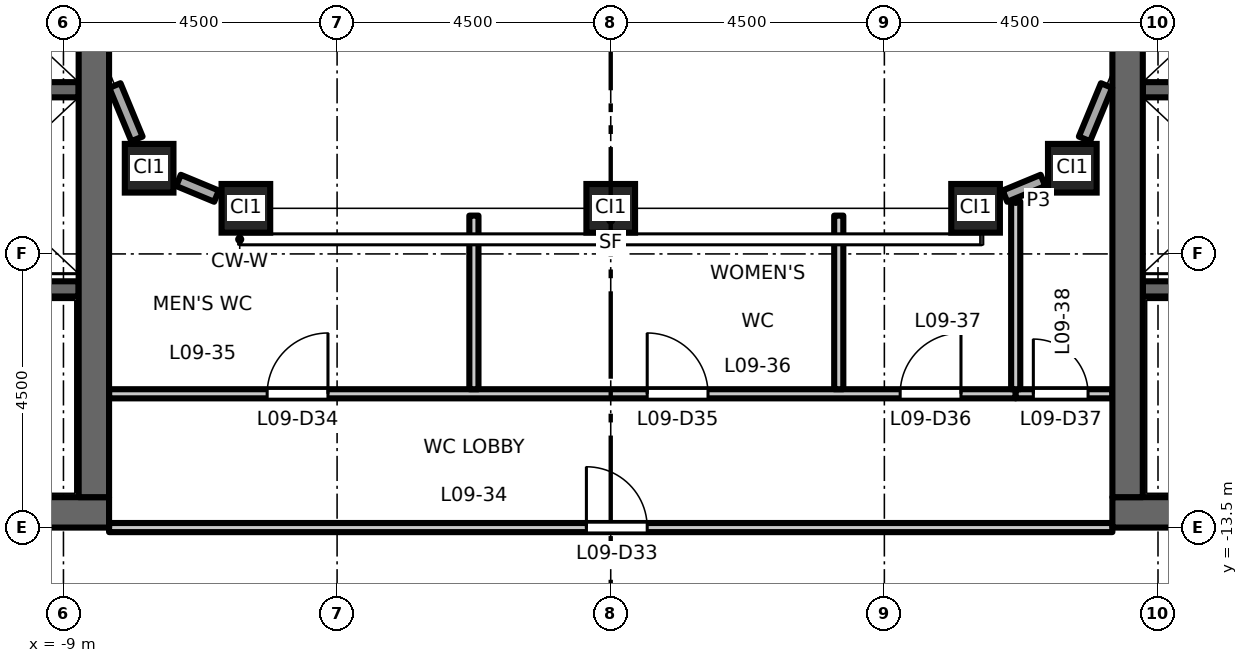
"""IFC4 building model, lengths in metres.
Left out: names, types, materials, properties, quantities, classifications, styles, units other than length and angle.
Written with IfcOpenShell. Run it as: python <this file> out.ifc"""

import sys

from ifc_helpers import new_model, si_unit, direction, frame, frame_2d, origin, origin_2d, place, context, subcontext, project, spatial, rectangle, hollow_rectangle, extrude, element, fill, save


model = new_model("IFC4")
c1 = context("Model", 3, precision=1e-05, world=origin(), true_north=direction((0.0, 1.0)))
c2 = subcontext(c1, "Body", "Model", "MODEL_VIEW")
j1 = project(units=[si_unit("LENGTHUNIT", "METRE"), si_unit("PLANEANGLEUNIT", "RADIAN")], contexts=[c1])
p1 = place(None, origin())
s1 = spatial("IfcSite", under=j1, at=p1, CompositionType="ELEMENT")
p2 = place(p1, origin())
s2 = spatial("IfcBuilding", under=s1, at=p2, CompositionType="ELEMENT")
p3 = place(p2, frame((0.0, 0.0, 44.7)))
s3 = spatial("IfcBuildingStorey", under=s2, at=p3, CompositionType="ELEMENT", Elevation=44.7)
for number, where, z_axis, x_axis in (
    (1, (-7.591, -7.591, 0.0), (0.0, 0.0, 1.0), (1.0, 0.0, 0.0)),
    (2, (-6.0, -8.25, 0.0), (0.0, 0.0, 1.0), (1.0, 0.0, 0.0)),
    (3, (0.0, -8.25, 0.0), (0.0, 0.0, 1.0), (1.0, 0.0, 0.0)),
    (4, (6.0, -8.25, 0.0), (0.0, 0.0, 1.0), (1.0, 0.0, 0.0)),
    (5, (7.591, -7.591, 0.0), (0.0, 0.0, 1.0), (1.0, 0.0, 0.0)),
):
    element("IfcColumn", number, at=place(p3, frame(where, z_axis=z_axis, x_axis=x_axis)), inside=s3, PredefinedType="COLUMN", context=c2, shape_type="SweptSolid", body=[
        extrude(hollow_rectangle(XDim=0.8, YDim=0.8, WallThickness=0.05, at=origin_2d()), origin(), (0.0, 0.0, 1.0), 4.5),
    ])
p4 = place(p3, frame((-8.75, -6.3, 0.0), z_axis=(0.0, 0.0, 1.0), x_axis=(-1.0, 0.0, 0.0)))
e6 = element("IfcWall", 6, at=p4, inside=s3, PredefinedType="SHEAR", context=c2, shape_type="SweptSolid", body=[
    extrude(rectangle(XDim=3.1, YDim=0.25, at=frame_2d((1.55, 0.0))), origin(), (0.0, 0.0, 1.0), 4.35),
])
p5 = place(p3, frame((-8.75, -9.575, 0.0), z_axis=(0.0, 0.0, 1.0), x_axis=(-1.0, 0.0, 0.0)))
e7 = element("IfcWall", 7, at=p5, inside=s3, PredefinedType="SHEAR", context=c2, shape_type="SweptSolid", body=[
    extrude(rectangle(XDim=8.0, YDim=0.25, at=frame_2d((4.0, 0.0))), origin(), (0.0, 0.0, 1.0), 4.35),
])
p6 = place(p5, frame((6.65, 0.0, 0.0)))
e8 = element("IfcOpeningElement", 8, at=p6, cuts=e7, PredefinedType="OPENING", context=c2, shape_type="SweptSolid", body=[
    extrude(rectangle(XDim=1.1, YDim=2.1, at=frame_2d((0.55, 1.05))), frame((0.0, 0.135, 0.0), z_axis=(0.0, -1.0, 0.0), x_axis=(1.0, 0.0, 0.0)), (0.0, 0.0, 1.0), 0.27),
])
p7 = place(p3, frame((-8.25, -13.25, 0.0), z_axis=(0.0, 0.0, 1.0), x_axis=(-1.0, 0.0, 0.0)))
e9 = element("IfcWall", 9, at=p7, inside=s3, PredefinedType="SHEAR", context=c2, shape_type="SweptSolid", body=[
    extrude(rectangle(XDim=13.5, YDim=0.5, at=frame_2d((6.75, 0.0))), origin(), (0.0, 0.0, 1.0), 4.35),
])
p8 = place(p3, frame((-8.5, -13.0, 0.0), z_axis=(0.0, 0.0, 1.0), x_axis=(0.0, 1.0, 0.0)))
e10 = element("IfcWall", 10, at=p8, inside=s3, PredefinedType="SHEAR", context=c2, shape_type="SweptSolid", body=[
    extrude(rectangle(XDim=26.0, YDim=0.5, at=frame_2d((13.0, 0.0))), origin(), (0.0, 0.0, 1.0), 4.35),
])
p9 = place(p3, frame((8.75, -6.3, 0.0), z_axis=(0.0, 0.0, 1.0), x_axis=(1.0, 0.0, 0.0)))
e11 = element("IfcWall", 11, at=p9, inside=s3, PredefinedType="SHEAR", context=c2, shape_type="SweptSolid", body=[
    extrude(rectangle(XDim=3.1, YDim=0.25, at=frame_2d((1.55, 0.0))), origin(), (0.0, 0.0, 1.0), 4.35),
])
p10 = place(p3, frame((8.75, -9.575, 0.0), z_axis=(0.0, 0.0, 1.0), x_axis=(1.0, 0.0, 0.0)))
e12 = element("IfcWall", 12, at=p10, inside=s3, PredefinedType="SHEAR", context=c2, shape_type="SweptSolid", body=[
    extrude(rectangle(XDim=8.0, YDim=0.25, at=frame_2d((4.0, 0.0))), origin(), (0.0, 0.0, 1.0), 4.35),
])
p11 = place(p10, frame((6.65, 0.0, 0.0)))
e13 = element("IfcOpeningElement", 13, at=p11, cuts=e12, PredefinedType="OPENING", context=c2, shape_type="SweptSolid", body=[
    extrude(rectangle(XDim=1.1, YDim=2.1, at=frame_2d((0.55, 1.05))), frame((0.0, 0.135, 0.0), z_axis=(0.0, -1.0, 0.0), x_axis=(1.0, 0.0, 0.0)), (0.0, 0.0, 1.0), 0.27),
])
p12 = place(p3, frame((8.25, -13.25, 0.0), z_axis=(0.0, 0.0, 1.0), x_axis=(1.0, 0.0, 0.0)))
e14 = element("IfcWall", 14, at=p12, inside=s3, PredefinedType="SHEAR", context=c2, shape_type="SweptSolid", body=[
    extrude(rectangle(XDim=13.5, YDim=0.5, at=frame_2d((6.75, 0.0))), origin(), (0.0, 0.0, 1.0), 4.35),
])
p13 = place(p3, frame((8.5, -13.0, 0.0), z_axis=(0.0, 0.0, 1.0), x_axis=(0.0, 1.0, 0.0)))
e15 = element("IfcWall", 15, at=p13, inside=s3, PredefinedType="SHEAR", context=c2, shape_type="SweptSolid", body=[
    extrude(rectangle(XDim=26.0, YDim=0.5, at=frame_2d((13.0, 0.0))), origin(), (0.0, 0.0, 1.0), 4.35),
])
p14 = place(p3, frame((6.483, -8.05, 0.0), z_axis=(0.0, 0.0, 1.0), x_axis=(0.923854141361, 0.382744726273, 0.0)))
e16 = element("IfcWall", 16, at=p14, inside=s3, PredefinedType="STANDARD", context=c2, shape_type="SweptSolid", body=[
    extrude(rectangle(XDim=0.677, YDim=0.2, at=frame_2d((0.338, 0.0))), origin(), (0.0, 0.0, 1.0), 3.73),
])
for number, where, z_axis, x_axis in (
    (17, (7.791, -7.108, 0.0), (0.0, 0.0, 1.0), (0.383, 0.924, 0.0)),
    (18, (-8.154, -6.231, 0.0), (0.0, 0.0, 1.0), (0.383, -0.924, 0.0)),
):
    element("IfcWall", number, at=place(p3, frame(where, z_axis=z_axis, x_axis=x_axis)), inside=s3, PredefinedType="STANDARD", context=c2, shape_type="SweptSolid", body=[
        extrude(rectangle(XDim=0.949, YDim=0.2, at=frame_2d((0.475, 0.0))), origin(), (0.0, 0.0, 1.0), 3.73),
    ])
p15 = place(p3, frame((-7.108, -7.791, 0.0), z_axis=(0.0, 0.0, 1.0), x_axis=(0.923854141361, -0.382744726273, 0.0)))
e19 = element("IfcWall", 19, at=p15, inside=s3, PredefinedType="STANDARD", context=c2, shape_type="SweptSolid", body=[
    extrude(rectangle(XDim=0.677, YDim=0.2, at=frame_2d((0.338, 0.0))), origin(), (0.0, 0.0, 1.0), 3.73),
])
p16 = place(p3, frame((-8.25, -13.5, 0.0), z_axis=(0.0, 0.0, 1.0), x_axis=(1.0, 0.0, 0.0)))
e20 = element("IfcWall", 20, at=p16, inside=s3, PredefinedType="PARTITIONING", context=c2, shape_type="SweptSolid", body=[
    extrude(rectangle(XDim=16.5, YDim=0.15, at=frame_2d((8.25, 0.0))), origin(), (0.0, 0.0, 1.0), 3.85),
])
p17 = place(p16, frame((7.85, 0.0, 0.0)))
e21 = element("IfcOpeningElement", 21, at=p17, cuts=e20, PredefinedType="OPENING", context=c2, shape_type="SweptSolid", body=[
    extrude(rectangle(XDim=1.0, YDim=2.1, at=frame_2d((0.5, 1.05))), frame((0.0, 0.085, 0.0), z_axis=(0.0, -1.0, 0.0), x_axis=(1.0, 0.0, 0.0)), (0.0, 0.0, 1.0), 0.17),
])
p18 = place(p3, frame((-8.25, -11.3, 0.0), z_axis=(0.0, 0.0, 1.0), x_axis=(1.0, 0.0, 0.0)))
e22 = element("IfcWall", 22, at=p18, inside=s3, PredefinedType="PARTITIONING", context=c2, shape_type="SweptSolid", body=[
    extrude(rectangle(XDim=14.91, YDim=0.15, at=frame_2d((7.455, 0.0))), origin(), (0.0, 0.0, 1.0), 4.35),
])
p19 = place(p18, frame((2.6, 0.0, 0.0)))
e23 = element("IfcOpeningElement", 23, at=p19, cuts=e22, PredefinedType="OPENING", context=c2, shape_type="SweptSolid", body=[
    extrude(rectangle(XDim=1.0, YDim=2.1, at=frame_2d((0.5, 1.05))), frame((0.0, 0.085, 0.0), z_axis=(0.0, -1.0, 0.0), x_axis=(1.0, 0.0, 0.0)), (0.0, 0.0, 1.0), 0.17),
])
p20 = place(p18, frame((8.85, 0.0, 0.0)))
e24 = element("IfcOpeningElement", 24, at=p20, cuts=e22, PredefinedType="OPENING", context=c2, shape_type="SweptSolid", body=[
    extrude(rectangle(XDim=1.0, YDim=2.1, at=frame_2d((0.5, 1.05))), frame((0.0, 0.085, 0.0), z_axis=(0.0, -1.0, 0.0), x_axis=(1.0, 0.0, 0.0)), (0.0, 0.0, 1.0), 0.17),
])
p21 = place(p18, frame((13.01, 0.0, 0.0)))
e25 = element("IfcOpeningElement", 25, at=p21, cuts=e22, PredefinedType="OPENING", context=c2, shape_type="SweptSolid", body=[
    extrude(rectangle(XDim=1.0, YDim=2.1, at=frame_2d((0.5, 1.05))), frame((0.0, 0.085, 0.0), z_axis=(0.0, -1.0, 0.0), x_axis=(1.0, 0.0, 0.0)), (0.0, 0.0, 1.0), 0.17),
])
p22 = place(p3, frame((6.66, -11.3, 0.0), z_axis=(0.0, 0.0, 1.0), x_axis=(1.0, 0.0, 0.0)))
e26 = element("IfcWall", 26, at=p22, inside=s3, PredefinedType="PARTITIONING", context=c2, shape_type="SweptSolid", body=[
    extrude(rectangle(XDim=1.59, YDim=0.15, at=frame_2d((0.795, 0.0))), origin(), (0.0, 0.0, 1.0), 4.35),
])
p23 = place(p22, frame((0.29, 0.0, 0.0)))
e27 = element("IfcOpeningElement", 27, at=p23, cuts=e26, PredefinedType="OPENING", context=c2, shape_type="SweptSolid", body=[
    extrude(rectangle(XDim=0.9, YDim=2.1, at=frame_2d((0.45, 1.05))), frame((0.0, 0.085, 0.0), z_axis=(0.0, -1.0, 0.0), x_axis=(1.0, 0.0, 0.0)), (0.0, 0.0, 1.0), 0.17),
])
for number, where, z_axis, x_axis in (
    (28, (-2.25, -11.225, 0.0), (0.0, 0.0, 1.0), (0.0, 1.0, 0.0)),
    (29, (3.75, -11.225, 0.0), (0.0, 0.0, 1.0), (0.0, 1.0, 0.0)),
):
    element("IfcWall", number, at=place(p3, frame(where, z_axis=z_axis, x_axis=x_axis)), inside=s3, PredefinedType="PARTITIONING", context=c2, shape_type="SweptSolid", body=[
        extrude(rectangle(XDim=2.855, YDim=0.15, at=frame_2d((1.427, 0.0))), origin(), (0.0, 0.0, 1.0), 4.35),
    ])
p24 = place(p3, frame((6.66, -11.225, 0.0), z_axis=(0.0, 0.0, 1.0), x_axis=(0.0, 1.0, 0.0)))
e30 = element("IfcWall", 30, at=p24, inside=s3, PredefinedType="PARTITIONING", context=c2, shape_type="SweptSolid", body=[
    extrude(rectangle(XDim=3.089, YDim=0.15, at=frame_2d((1.544, 0.0))), origin(), (0.0, 0.0, 1.0), 4.35),
])
p25 = place(p17, origin())
e31 = element("IfcDoor", 31, at=p25, inside=s3, OperationType="SINGLE_SWING_LEFT", PredefinedType="DOOR", context=c2, shape_type="SweptSolid", body=[
    extrude(rectangle(XDim=1.0, YDim=2.1, at=frame_2d((0.5, 1.05))), frame((0.0, 0.025, 0.0), z_axis=(0.0, -1.0, 0.0), x_axis=(1.0, 0.0, 0.0)), (0.0, 0.0, 1.0), 0.05),
])
fill(e21, e31)
p26 = place(p19, origin())
e32 = element("IfcDoor", 32, at=p26, inside=s3, OperationType="SINGLE_SWING_RIGHT", PredefinedType="DOOR", context=c2, shape_type="SweptSolid", body=[
    extrude(rectangle(XDim=1.0, YDim=2.1, at=frame_2d((0.5, 1.05))), frame((0.0, 0.025, 0.0), z_axis=(0.0, -1.0, 0.0), x_axis=(1.0, 0.0, 0.0)), (0.0, 0.0, 1.0), 0.05),
])
fill(e23, e32)
p27 = place(p20, origin())
e33 = element("IfcDoor", 33, at=p27, inside=s3, OperationType="SINGLE_SWING_LEFT", PredefinedType="DOOR", context=c2, shape_type="SweptSolid", body=[
    extrude(rectangle(XDim=1.0, YDim=2.1, at=frame_2d((0.5, 1.05))), frame((0.0, 0.025, 0.0), z_axis=(0.0, -1.0, 0.0), x_axis=(1.0, 0.0, 0.0)), (0.0, 0.0, 1.0), 0.05),
])
fill(e24, e33)
p28 = place(p21, origin())
e34 = element("IfcDoor", 34, at=p28, inside=s3, OperationType="SINGLE_SWING_RIGHT", PredefinedType="DOOR", context=c2, shape_type="SweptSolid", body=[
    extrude(rectangle(XDim=1.0, YDim=2.1, at=frame_2d((0.5, 1.05))), frame((0.0, 0.025, 0.0), z_axis=(0.0, -1.0, 0.0), x_axis=(1.0, 0.0, 0.0)), (0.0, 0.0, 1.0), 0.05),
])
fill(e25, e34)
p29 = place(p23, origin())
e35 = element("IfcDoor", 35, at=p29, inside=s3, OperationType="SINGLE_SWING_LEFT", PredefinedType="DOOR", context=c2, shape_type="SweptSolid", body=[
    extrude(rectangle(XDim=0.9, YDim=2.1, at=frame_2d((0.45, 1.05))), frame((0.0, 0.025, 0.0), z_axis=(0.0, -1.0, 0.0), x_axis=(1.0, 0.0, 0.0)), (0.0, 0.0, 1.0), 0.05),
])
fill(e27, e35)
save(model, sys.argv[1])
